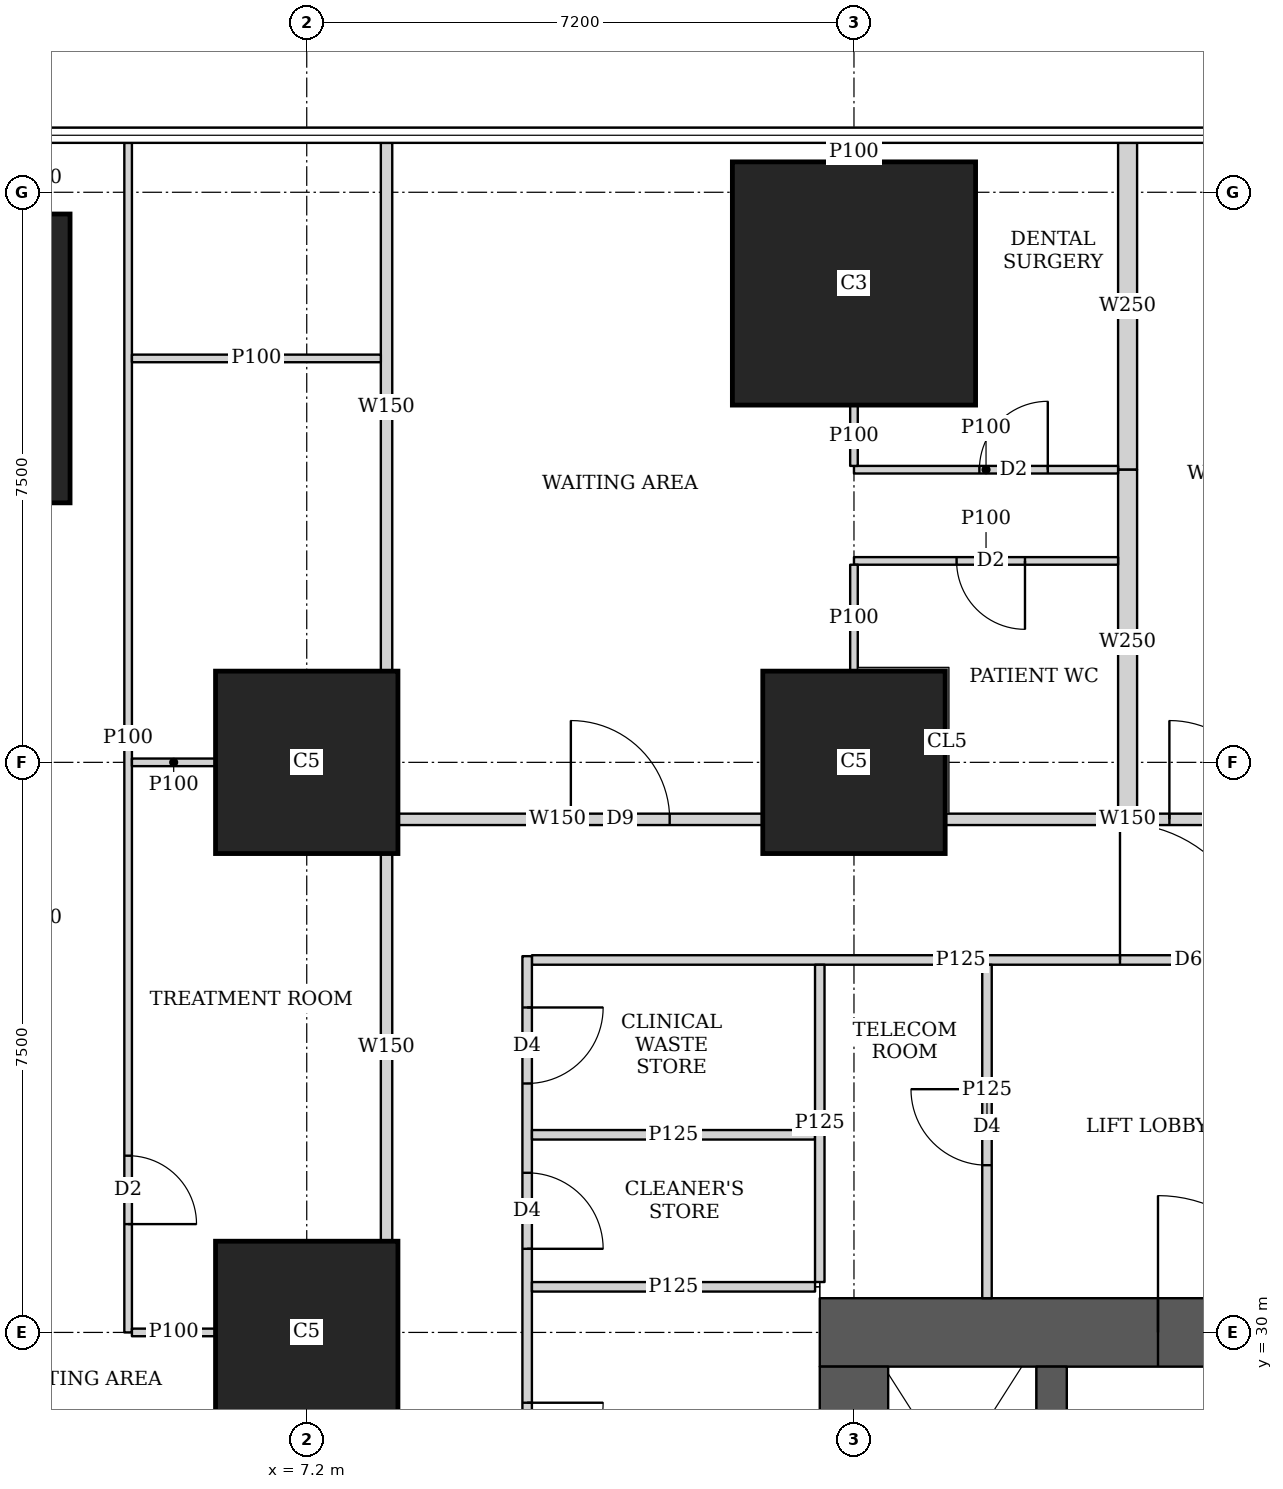
"""IFC4 building model, lengths in metres.
Left out: names, types, materials, properties, quantities, classifications, styles, units other than length and angle.
Written with IfcOpenShell. Run it as: python <this file> out.ifc"""

import sys

from ifc_helpers import new_model, si_unit, direction, frame, frame_2d, origin, origin_2d, place, context, subcontext, project, spatial, rectangle, extrude, element, fill, save


model = new_model("IFC4")
c1 = context("Model", 3, precision=1e-05, world=origin(), true_north=direction((0.0, 1.0)))
c2 = subcontext(c1, "Body", "Model", "MODEL_VIEW")
j1 = project(units=[si_unit("LENGTHUNIT", "METRE"), si_unit("PLANEANGLEUNIT", "RADIAN")], contexts=[c1])
p1 = place(None, origin())
s1 = spatial("IfcSite", under=j1, at=p1, CompositionType="ELEMENT")
p2 = place(p1, origin())
s2 = spatial("IfcBuilding", under=s1, at=p2, CompositionType="ELEMENT")
p3 = place(p2, frame((0.0, 0.0, 10.1)))
s3 = spatial("IfcBuildingStorey", under=s2, at=p3, CompositionType="ELEMENT", Elevation=10.1)
for number, where, z_axis, x_axis in (
    (1, (7.2, 30.0, 0.0), (0.0, 0.0, 1.0), (1.0, 0.0, 0.0)),
    (2, (7.2, 37.5, 0.0), (0.0, 0.0, 1.0), (1.0, 0.0, 0.0)),
    (3, (14.4, 37.5, 0.0), (0.0, 0.0, 1.0), (1.0, 0.0, 0.0)),
):
    element("IfcColumn", number, at=place(p3, frame(where, z_axis=z_axis, x_axis=x_axis)), inside=s3, PredefinedType="COLUMN", context=c2, shape_type="SweptSolid", body=[
        extrude(rectangle(XDim=2.4, YDim=2.4, at=origin_2d()), origin(), (0.0, 0.0, 1.0), 4.5),
    ])
p4 = place(p3, frame((2.186, 42.814, 0.0), z_axis=(0.0, 0.0, 1.0), x_axis=(1.0, 0.0, 0.0)))
e4 = element("IfcColumn", 4, at=p4, inside=s3, PredefinedType="COLUMN", context=c2, shape_type="SweptSolid", body=[
    extrude(rectangle(XDim=3.8, YDim=3.8, at=origin_2d()), origin(), (0.0, 0.0, 1.0), 4.5),
])
p5 = place(p3, frame((14.4, 43.8, 0.0), z_axis=(0.0, 0.0, 1.0), x_axis=(1.0, 0.0, 0.0)))
e5 = element("IfcColumn", 5, at=p5, inside=s3, PredefinedType="COLUMN", context=c2, shape_type="SweptSolid", body=[
    extrude(rectangle(XDim=3.2, YDim=3.2, at=origin_2d()), origin(), (0.0, 0.0, 1.0), 4.5),
])
p6 = place(p3, frame((13.95, 30.0, 0.0), z_axis=(0.0, 0.0, 1.0), x_axis=(1.0, 0.0, 0.0)))
e6 = element("IfcWall", 6, at=p6, inside=s3, PredefinedType="SHEAR", context=c2, shape_type="SweptSolid", body=[
    extrude(rectangle(XDim=15.3, YDim=0.9, at=frame_2d((7.65, 0.0))), origin(), (0.0, 0.0, 1.0), 4.5),
])
p7 = place(p6, frame((4.45, 0.0, 0.0)))
e7 = element("IfcOpeningElement", 7, at=p7, cuts=e6, PredefinedType="OPENING", context=c2, shape_type="SweptSolid", body=[
    extrude(rectangle(XDim=1.8, YDim=2.1, at=frame_2d((0.9, 1.05))), frame((0.0, 0.46, 0.0), z_axis=(0.0, -1.0, 0.0), x_axis=(1.0, 0.0, 0.0)), (0.0, 0.0, 1.0), 0.92),
])
p8 = place(p6, frame((10.7, 0.0, 0.0)))
e8 = element("IfcOpeningElement", 8, at=p8, cuts=e6, PredefinedType="OPENING", context=c2, shape_type="SweptSolid", body=[
    extrude(rectangle(XDim=1.1, YDim=2.1, at=frame_2d((0.55, 1.05))), frame((0.0, 0.46, 0.0), z_axis=(0.0, -1.0, 0.0), x_axis=(1.0, 0.0, 0.0)), (0.0, 0.0, 1.0), 0.92),
])
p9 = place(p3, frame((14.4, 15.45, 0.0), z_axis=(0.0, 0.0, 1.0), x_axis=(0.0, 1.0, 0.0)))
e9 = element("IfcWall", 9, at=p9, inside=s3, PredefinedType="SHEAR", context=c2, shape_type="SweptSolid", body=[
    extrude(rectangle(XDim=14.1, YDim=0.9, at=frame_2d((7.05, 0.0))), origin(), (0.0, 0.0, 1.0), 4.5),
])
p10 = place(p3, frame((17.0, 15.45, 0.0), z_axis=(0.0, 0.0, 1.0), x_axis=(0.0, 1.0, 0.0)))
e10 = element("IfcWall", 10, at=p10, inside=s3, PredefinedType="SHEAR", context=c2, shape_type="SweptSolid", body=[
    extrude(rectangle(XDim=14.1, YDim=0.4, at=frame_2d((7.05, 0.0))), origin(), (0.0, 0.0, 1.0), 4.5),
])
p11 = place(p3, frame((8.25, 31.201, 0.0), z_axis=(0.0, 0.0, 1.0), x_axis=(0.0, 1.0, 0.0)))
e11 = element("IfcWall", 11, at=p11, inside=s3, PredefinedType="SOLIDWALL", context=c2, shape_type="SweptSolid", body=[
    extrude(rectangle(XDim=5.098, YDim=0.15, at=frame_2d((2.549, 0.0))), origin(), (0.0, 0.0, 1.0), 4.2),
])
p12 = place(p3, frame((8.25, 38.701, 0.0), z_axis=(0.0, 0.0, 1.0), x_axis=(0.0, 1.0, 0.0)))
e12 = element("IfcWall", 12, at=p12, inside=s3, PredefinedType="SOLIDWALL", context=c2, shape_type="SweptSolid", body=[
    extrude(rectangle(XDim=6.949, YDim=0.15, at=frame_2d((3.475, 0.0))), origin(), (0.0, 0.0, 1.0), 2.4),
])
p13 = place(p3, frame((8.401, 36.75, 0.0), z_axis=(0.0, 0.0, 1.0), x_axis=(1.0, 0.0, 0.0)))
e13 = element("IfcWall", 13, at=p13, inside=s3, PredefinedType="SOLIDWALL", context=c2, shape_type="SweptSolid", body=[
    extrude(rectangle(XDim=4.798, YDim=0.15, at=frame_2d((2.399, 0.0))), origin(), (0.0, 0.0, 1.0), 2.6),
])
p14 = place(p13, frame((2.274, 0.0, 0.0)))
e14 = element("IfcOpeningElement", 14, at=p14, cuts=e13, PredefinedType="OPENING", context=c2, shape_type="SweptSolid", body=[
    extrude(rectangle(XDim=1.3, YDim=2.1, at=frame_2d((0.65, 1.05))), frame((0.0, 0.085, 0.0), z_axis=(0.0, -1.0, 0.0), x_axis=(1.0, 0.0, 0.0)), (0.0, 0.0, 1.0), 0.17),
])
p15 = place(p3, frame((15.601, 36.75, 0.0), z_axis=(0.0, 0.0, 1.0), x_axis=(1.0, 0.0, 0.0)))
e15 = element("IfcWall", 15, at=p15, inside=s3, PredefinedType="SOLIDWALL", context=c2, shape_type="SweptSolid", body=[
    extrude(rectangle(XDim=4.798, YDim=0.15, at=frame_2d((2.399, 0.0))), origin(), (0.0, 0.0, 1.0), 2.6),
])
p16 = place(p15, frame((2.949, 0.0, 0.0)))
e16 = element("IfcOpeningElement", 16, at=p16, cuts=e15, PredefinedType="OPENING", context=c2, shape_type="SweptSolid", body=[
    extrude(rectangle(XDim=1.3, YDim=2.1, at=frame_2d((0.65, 1.05))), frame((0.0, 0.085, 0.0), z_axis=(0.0, -1.0, 0.0), x_axis=(1.0, 0.0, 0.0)), (0.0, 0.0, 1.0), 0.17),
])
p17 = place(p3, frame((4.85, 30.0, 0.0), z_axis=(0.0, 0.0, 1.0), x_axis=(0.0, 1.0, 0.0)))
e17 = element("IfcWall", 17, at=p17, inside=s3, PredefinedType="PARTITIONING", context=c2, shape_type="SweptSolid", body=[
    extrude(rectangle(XDim=15.65, YDim=0.1, at=frame_2d((7.825, 0.0))), origin(), (0.0, 0.0, 1.0), 2.4),
])
p18 = place(p17, frame((1.425, 0.0, 0.0)))
e18 = element("IfcOpeningElement", 18, at=p18, cuts=e17, PredefinedType="OPENING", context=c2, shape_type="SweptSolid", body=[
    extrude(rectangle(XDim=0.9, YDim=2.1, at=frame_2d((0.45, 1.05))), frame((0.0, 0.06, 0.0), z_axis=(0.0, -1.0, 0.0), x_axis=(1.0, 0.0, 0.0)), (0.0, 0.0, 1.0), 0.12),
])
p19 = place(p3, frame((4.9, 30.0, 0.0), z_axis=(0.0, 0.0, 1.0), x_axis=(1.0, 0.0, 0.0)))
e19 = element("IfcWall", 19, at=p19, inside=s3, PredefinedType="PARTITIONING", context=c2, shape_type="SweptSolid", body=[
    extrude(rectangle(XDim=1.099, YDim=0.1, at=frame_2d((0.55, 0.0))), origin(), (0.0, 0.0, 1.0), 2.6),
])
p20 = place(p3, frame((4.9, 37.5, 0.0), z_axis=(0.0, 0.0, 1.0), x_axis=(1.0, 0.0, 0.0)))
e20 = element("IfcWall", 20, at=p20, inside=s3, PredefinedType="PARTITIONING", context=c2, shape_type="SweptSolid", body=[
    extrude(rectangle(XDim=1.099, YDim=0.1, at=frame_2d((0.55, 0.0))), origin(), (0.0, 0.0, 1.0), 4.2),
])
p21 = place(p3, frame((4.9, 42.814, 0.0), z_axis=(0.0, 0.0, 1.0), x_axis=(1.0, 0.0, 0.0)))
e21 = element("IfcWall", 21, at=p21, inside=s3, PredefinedType="PARTITIONING", context=c2, shape_type="SweptSolid", body=[
    extrude(rectangle(XDim=3.275, YDim=0.1, at=frame_2d((1.638, 0.0))), origin(), (0.0, 0.0, 1.0), 2.4),
])
p22 = place(p3, frame((14.4, 41.35, 0.0), z_axis=(0.0, 0.0, 1.0), x_axis=(1.0, 0.0, 0.0)))
e22 = element("IfcWall", 22, at=p22, inside=s3, PredefinedType="PARTITIONING", context=c2, shape_type="SweptSolid", body=[
    extrude(rectangle(XDim=3.475, YDim=0.1, at=frame_2d((1.738, 0.0))), origin(), (0.0, 0.0, 1.0), 2.6),
])
p23 = place(p22, frame((1.65, 0.0, 0.0)))
e23 = element("IfcOpeningElement", 23, at=p23, cuts=e22, PredefinedType="OPENING", context=c2, shape_type="SweptSolid", body=[
    extrude(rectangle(XDim=0.9, YDim=2.1, at=frame_2d((0.45, 1.05))), frame((0.0, 0.06, 0.0), z_axis=(0.0, -1.0, 0.0), x_axis=(1.0, 0.0, 0.0)), (0.0, 0.0, 1.0), 0.12),
])
p24 = place(p3, frame((14.4, 40.15, 0.0), z_axis=(0.0, 0.0, 1.0), x_axis=(1.0, 0.0, 0.0)))
e24 = element("IfcWall", 24, at=p24, inside=s3, PredefinedType="PARTITIONING", context=c2, shape_type="SweptSolid", body=[
    extrude(rectangle(XDim=3.475, YDim=0.1, at=frame_2d((1.738, 0.0))), origin(), (0.0, 0.0, 1.0), 2.6),
])
p25 = place(p24, frame((1.35, 0.0, 0.0)))
e25 = element("IfcOpeningElement", 25, at=p25, cuts=e24, PredefinedType="OPENING", context=c2, shape_type="SweptSolid", body=[
    extrude(rectangle(XDim=0.9, YDim=2.1, at=frame_2d((0.45, 1.05))), frame((0.0, 0.06, 0.0), z_axis=(0.0, -1.0, 0.0), x_axis=(1.0, 0.0, 0.0)), (0.0, 0.0, 1.0), 0.12),
])
p26 = place(p3, frame((14.4, 41.4, 0.0), z_axis=(0.0, 0.0, 1.0), x_axis=(0.0, 1.0, 0.0)))
e26 = element("IfcWall", 26, at=p26, inside=s3, PredefinedType="PARTITIONING", context=c2, shape_type="SweptSolid", body=[
    extrude(rectangle(XDim=0.799, YDim=0.1, at=frame_2d((0.399, 0.0))), origin(), (0.0, 0.0, 1.0), 2.6),
])
p27 = place(p3, frame((14.4, 45.401, 0.0), z_axis=(0.0, 0.0, 1.0), x_axis=(0.0, 1.0, 0.0)))
e27 = element("IfcWall", 27, at=p27, inside=s3, PredefinedType="PARTITIONING", context=c2, shape_type="SweptSolid", body=[
    extrude(rectangle(XDim=0.249, YDim=0.1, at=frame_2d((0.125, 0.0))), origin(), (0.0, 0.0, 1.0), 4.2),
])
p28 = place(p3, frame((14.4, 38.701, 0.0), z_axis=(0.0, 0.0, 1.0), x_axis=(0.0, 1.0, 0.0)))
e28 = element("IfcWall", 28, at=p28, inside=s3, PredefinedType="PARTITIONING", context=c2, shape_type="SweptSolid", body=[
    extrude(rectangle(XDim=1.399, YDim=0.1, at=frame_2d((0.7, 0.0))), origin(), (0.0, 0.0, 1.0), 2.6),
])
p29 = place(p3, frame((18.0, 41.35, 0.0), z_axis=(0.0, 0.0, 1.0), x_axis=(0.0, 1.0, 0.0)))
e29 = element("IfcWall", 29, at=p29, inside=s3, PredefinedType="SOLIDWALL", context=c2, shape_type="SweptSolid", body=[
    extrude(rectangle(XDim=4.3, YDim=0.25, at=frame_2d((2.15, 0.0))), origin(), (0.0, 0.0, 1.0), 2.4),
])
p30 = place(p3, frame((18.0, 36.825, 0.0), z_axis=(0.0, 0.0, 1.0), x_axis=(0.0, 1.0, 0.0)))
e30 = element("IfcWall", 30, at=p30, inside=s3, PredefinedType="SOLIDWALL", context=c2, shape_type="SweptSolid", body=[
    extrude(rectangle(XDim=4.525, YDim=0.25, at=frame_2d((2.263, 0.0))), origin(), (0.0, 0.0, 1.0), 2.6),
])
p31 = place(p3, frame((10.1, 10.05, 0.0), z_axis=(0.0, 0.0, 1.0), x_axis=(0.0, 1.0, 0.0)))
e31 = element("IfcWall", 31, at=p31, inside=s3, PredefinedType="PARTITIONING", context=c2, shape_type="SweptSolid", body=[
    extrude(rectangle(XDim=24.9, YDim=0.125, at=frame_2d((12.45, 0.0))), origin(), (0.0, 0.0, 1.0), 2.6),
])
p32 = place(p31, frame((1.675, 0.0, 0.0)))
e32 = element("IfcOpeningElement", 32, at=p32, cuts=e31, PredefinedType="OPENING", context=c2, shape_type="SweptSolid", body=[
    extrude(rectangle(XDim=1.0, YDim=2.1, at=frame_2d((0.5, 1.05))), frame((0.0, 0.073, 0.0), z_axis=(0.0, -1.0, 0.0), x_axis=(1.0, 0.0, 0.0)), (0.0, 0.0, 1.0), 0.145),
])
p33 = place(p31, frame((5.85, 0.0, 0.0)))
e33 = element("IfcOpeningElement", 33, at=p33, cuts=e31, PredefinedType="OPENING", context=c2, shape_type="SweptSolid", body=[
    extrude(rectangle(XDim=1.0, YDim=2.1, at=frame_2d((0.5, 1.05))), frame((0.0, 0.073, 0.0), z_axis=(0.0, -1.0, 0.0), x_axis=(1.0, 0.0, 0.0)), (0.0, 0.0, 1.0), 0.145),
])
p34 = place(p31, frame((8.975, 0.0, 0.0)))
e34 = element("IfcOpeningElement", 34, at=p34, cuts=e31, PredefinedType="OPENING", context=c2, shape_type="SweptSolid", body=[
    extrude(rectangle(XDim=1.0, YDim=2.1, at=frame_2d((0.5, 1.05))), frame((0.0, 0.073, 0.0), z_axis=(0.0, -1.0, 0.0), x_axis=(1.0, 0.0, 0.0)), (0.0, 0.0, 1.0), 0.145),
])
p35 = place(p31, frame((11.025, 0.0, 0.0)))
e35 = element("IfcOpeningElement", 35, at=p35, cuts=e31, PredefinedType="OPENING", context=c2, shape_type="SweptSolid", body=[
    extrude(rectangle(XDim=1.0, YDim=2.1, at=frame_2d((0.5, 1.05))), frame((0.0, 0.073, 0.0), z_axis=(0.0, -1.0, 0.0), x_axis=(1.0, 0.0, 0.0)), (0.0, 0.0, 1.0), 0.145),
])
p36 = place(p31, frame((13.975, 0.0, 0.0)))
e36 = element("IfcOpeningElement", 36, at=p36, cuts=e31, PredefinedType="OPENING", context=c2, shape_type="SweptSolid", body=[
    extrude(rectangle(XDim=1.0, YDim=2.1, at=frame_2d((0.5, 1.05))), frame((0.0, 0.073, 0.0), z_axis=(0.0, -1.0, 0.0), x_axis=(1.0, 0.0, 0.0)), (0.0, 0.0, 1.0), 0.145),
])
p37 = place(p31, frame((18.025, 0.0, 0.0)))
e37 = element("IfcOpeningElement", 37, at=p37, cuts=e31, PredefinedType="OPENING", context=c2, shape_type="SweptSolid", body=[
    extrude(rectangle(XDim=1.0, YDim=2.1, at=frame_2d((0.5, 1.05))), frame((0.0, 0.073, 0.0), z_axis=(0.0, -1.0, 0.0), x_axis=(1.0, 0.0, 0.0)), (0.0, 0.0, 1.0), 0.145),
])
p38 = place(p31, frame((21.05, 0.0, 0.0)))
e38 = element("IfcOpeningElement", 38, at=p38, cuts=e31, PredefinedType="OPENING", context=c2, shape_type="SweptSolid", body=[
    extrude(rectangle(XDim=1.0, YDim=2.1, at=frame_2d((0.5, 1.05))), frame((0.0, 0.073, 0.0), z_axis=(0.0, -1.0, 0.0), x_axis=(1.0, 0.0, 0.0)), (0.0, 0.0, 1.0), 0.145),
])
p39 = place(p31, frame((23.225, 0.0, 0.0)))
e39 = element("IfcOpeningElement", 39, at=p39, cuts=e31, PredefinedType="OPENING", context=c2, shape_type="SweptSolid", body=[
    extrude(rectangle(XDim=1.0, YDim=2.1, at=frame_2d((0.5, 1.05))), frame((0.0, 0.073, 0.0), z_axis=(0.0, -1.0, 0.0), x_axis=(1.0, 0.0, 0.0)), (0.0, 0.0, 1.0), 0.145),
])
p40 = place(p3, frame((10.163, 30.6, 0.0), z_axis=(0.0, 0.0, 1.0), x_axis=(1.0, 0.0, 0.0)))
e40 = element("IfcWall", 40, at=p40, inside=s3, PredefinedType="PARTITIONING", context=c2, shape_type="SweptSolid", body=[
    extrude(rectangle(XDim=3.725, YDim=0.125, at=frame_2d((1.862, 0.0))), origin(), (0.0, 0.0, 1.0), 2.6),
])
p41 = place(p3, frame((13.95, 30.663, 0.0), z_axis=(0.0, 0.0, 1.0), x_axis=(0.0, 1.0, 0.0)))
e41 = element("IfcWall", 41, at=p41, inside=s3, PredefinedType="PARTITIONING", context=c2, shape_type="SweptSolid", body=[
    extrude(rectangle(XDim=4.174, YDim=0.125, at=frame_2d((2.087, 0.0))), origin(), (0.0, 0.0, 1.0), 2.6),
])
p42 = place(p3, frame((10.163, 34.9, 0.0), z_axis=(0.0, 0.0, 1.0), x_axis=(1.0, 0.0, 0.0)))
e42 = element("IfcWall", 42, at=p42, inside=s3, PredefinedType="PARTITIONING", context=c2, shape_type="SweptSolid", body=[
    extrude(rectangle(XDim=11.287, YDim=0.125, at=frame_2d((5.644, 0.0))), origin(), (0.0, 0.0, 1.0), 2.2),
])
p43 = place(p42, frame((7.737, 0.0, 0.0)))
e43 = element("IfcOpeningElement", 43, at=p43, cuts=e42, PredefinedType="OPENING", context=c2, shape_type="SweptSolid", body=[
    extrude(rectangle(XDim=1.8, YDim=2.1, at=frame_2d((0.9, 1.05))), frame((0.0, 0.073, 0.0), z_axis=(0.0, -1.0, 0.0), x_axis=(1.0, 0.0, 0.0)), (0.0, 0.0, 1.0), 0.145),
])
p44 = place(p3, frame((16.15, 30.45, 0.0), z_axis=(0.0, 0.0, 1.0), x_axis=(0.0, 1.0, 0.0)))
e44 = element("IfcWall", 44, at=p44, inside=s3, PredefinedType="PARTITIONING", context=c2, shape_type="SweptSolid", body=[
    extrude(rectangle(XDim=4.387, YDim=0.125, at=frame_2d((2.193, 0.0))), origin(), (0.0, 0.0, 1.0), 4.2),
])
p45 = place(p44, frame((1.75, 0.0, 0.0)))
e45 = element("IfcOpeningElement", 45, at=p45, cuts=e44, PredefinedType="OPENING", context=c2, shape_type="SweptSolid", body=[
    extrude(rectangle(XDim=1.0, YDim=2.1, at=frame_2d((0.5, 1.05))), frame((0.0, 0.073, 0.0), z_axis=(0.0, -1.0, 0.0), x_axis=(1.0, 0.0, 0.0)), (0.0, 0.0, 1.0), 0.145),
])
p46 = place(p3, frame((10.163, 32.6, 0.0), z_axis=(0.0, 0.0, 1.0), x_axis=(1.0, 0.0, 0.0)))
e46 = element("IfcWall", 46, at=p46, inside=s3, PredefinedType="PARTITIONING", context=c2, shape_type="SweptSolid", body=[
    extrude(rectangle(XDim=3.725, YDim=0.125, at=frame_2d((1.862, 0.0))), origin(), (0.0, 0.0, 1.0), 2.6),
])
p47 = place(p18, origin())
e47 = element("IfcDoor", 47, at=p47, inside=s3, OperationType="SINGLE_SWING_RIGHT", PredefinedType="DOOR", context=c2, shape_type="SweptSolid", body=[
    extrude(rectangle(XDim=0.9, YDim=2.1, at=frame_2d((0.45, 1.05))), frame((0.0, 0.025, 0.0), z_axis=(0.0, -1.0, 0.0), x_axis=(1.0, 0.0, 0.0)), (0.0, 0.0, 1.0), 0.05),
])
fill(e18, e47)
p48 = place(p23, origin())
e48 = element("IfcDoor", 48, at=p48, inside=s3, OperationType="SINGLE_SWING_RIGHT", PredefinedType="DOOR", context=c2, shape_type="SweptSolid", body=[
    extrude(rectangle(XDim=0.9, YDim=2.1, at=frame_2d((0.45, 1.05))), frame((0.0, 0.025, 0.0), z_axis=(0.0, -1.0, 0.0), x_axis=(1.0, 0.0, 0.0)), (0.0, 0.0, 1.0), 0.05),
])
fill(e23, e48)
p49 = place(p25, origin())
e49 = element("IfcDoor", 49, at=p49, inside=s3, OperationType="SINGLE_SWING_LEFT", PredefinedType="DOOR", context=c2, shape_type="SweptSolid", body=[
    extrude(rectangle(XDim=0.9, YDim=2.1, at=frame_2d((0.45, 1.05))), frame((0.0, 0.025, 0.0), z_axis=(0.0, -1.0, 0.0), x_axis=(1.0, 0.0, 0.0)), (0.0, 0.0, 1.0), 0.05),
])
fill(e25, e49)
p50 = place(p14, origin())
e50 = element("IfcDoor", 50, at=p50, inside=s3, OperationType="DOUBLE_DOOR_SINGLE_SWING", PredefinedType="DOOR", context=c2, shape_type="SweptSolid", body=[
    extrude(rectangle(XDim=1.3, YDim=2.1, at=frame_2d((0.65, 1.05))), frame((0.0, 0.025, 0.0), z_axis=(0.0, -1.0, 0.0), x_axis=(1.0, 0.0, 0.0)), (0.0, 0.0, 1.0), 0.05),
])
fill(e14, e50)
p51 = place(p16, origin())
e51 = element("IfcDoor", 51, at=p51, inside=s3, OperationType="DOUBLE_DOOR_SINGLE_SWING", PredefinedType="DOOR", context=c2, shape_type="SweptSolid", body=[
    extrude(rectangle(XDim=1.3, YDim=2.1, at=frame_2d((0.65, 1.05))), frame((0.0, 0.025, 0.0), z_axis=(0.0, -1.0, 0.0), x_axis=(1.0, 0.0, 0.0)), (0.0, 0.0, 1.0), 0.05),
])
fill(e16, e51)
p52 = place(p45, origin())
e52 = element("IfcDoor", 52, at=p52, inside=s3, OperationType="SINGLE_SWING_RIGHT", PredefinedType="DOOR", context=c2, shape_type="SweptSolid", body=[
    extrude(rectangle(XDim=1.0, YDim=2.1, at=frame_2d((0.5, 1.05))), frame((0.0, 0.025, 0.0), z_axis=(0.0, -1.0, 0.0), x_axis=(1.0, 0.0, 0.0)), (0.0, 0.0, 1.0), 0.05),
])
fill(e45, e52)
p53 = place(p43, origin())
e53 = element("IfcDoor", 53, at=p53, inside=s3, OperationType="DOUBLE_DOOR_SINGLE_SWING", PredefinedType="DOOR", context=c2, shape_type="SweptSolid", body=[
    extrude(rectangle(XDim=1.8, YDim=2.1, at=frame_2d((0.9, 1.05))), frame((0.0, 0.025, 0.0), z_axis=(0.0, -1.0, 0.0), x_axis=(1.0, 0.0, 0.0)), (0.0, 0.0, 1.0), 0.05),
])
fill(e43, e53)
p54 = place(p37, origin())
e54 = element("IfcDoor", 54, at=p54, inside=s3, OperationType="SINGLE_SWING_LEFT", PredefinedType="DOOR", context=c2, shape_type="SweptSolid", body=[
    extrude(rectangle(XDim=1.0, YDim=2.1, at=frame_2d((0.5, 1.05))), frame((0.0, 0.025, 0.0), z_axis=(0.0, -1.0, 0.0), x_axis=(1.0, 0.0, 0.0)), (0.0, 0.0, 1.0), 0.05),
])
fill(e37, e54)
p55 = place(p38, origin())
e55 = element("IfcDoor", 55, at=p55, inside=s3, OperationType="SINGLE_SWING_RIGHT", PredefinedType="DOOR", context=c2, shape_type="SweptSolid", body=[
    extrude(rectangle(XDim=1.0, YDim=2.1, at=frame_2d((0.5, 1.05))), frame((0.0, 0.025, 0.0), z_axis=(0.0, -1.0, 0.0), x_axis=(1.0, 0.0, 0.0)), (0.0, 0.0, 1.0), 0.05),
])
fill(e38, e55)
p56 = place(p39, origin())
e56 = element("IfcDoor", 56, at=p56, inside=s3, OperationType="SINGLE_SWING_LEFT", PredefinedType="DOOR", context=c2, shape_type="SweptSolid", body=[
    extrude(rectangle(XDim=1.0, YDim=2.1, at=frame_2d((0.5, 1.05))), frame((0.0, 0.025, 0.0), z_axis=(0.0, -1.0, 0.0), x_axis=(1.0, 0.0, 0.0)), (0.0, 0.0, 1.0), 0.05),
])
fill(e39, e56)
p57 = place(p7, origin())
e57 = element("IfcDoor", 57, at=p57, inside=s3, OperationType="DOUBLE_DOOR_SINGLE_SWING", PredefinedType="DOOR", context=c2, shape_type="SweptSolid", body=[
    extrude(rectangle(XDim=1.8, YDim=2.1, at=frame_2d((0.9, 1.05))), frame((0.0, 0.025, 0.0), z_axis=(0.0, -1.0, 0.0), x_axis=(1.0, 0.0, 0.0)), (0.0, 0.0, 1.0), 0.05),
])
fill(e7, e57)
save(model, sys.argv[1])
